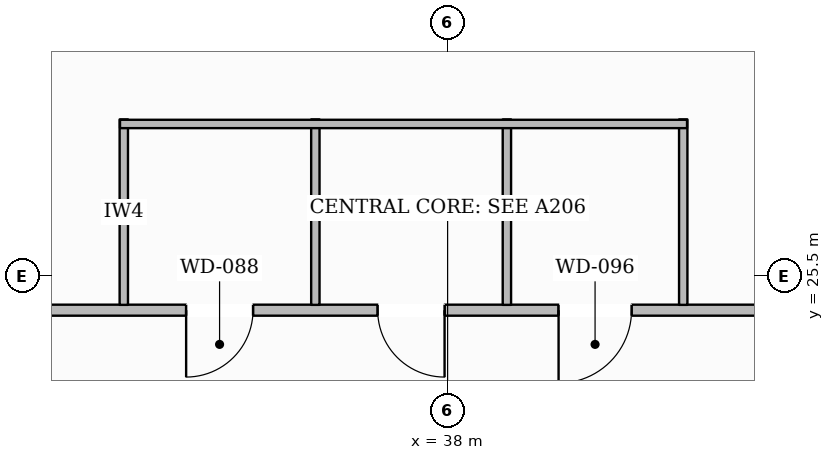
"""IFC4 building model, lengths in metres.
Left out: names, types, materials, properties, quantities, classifications, styles, units other than length and angle.
Written with IfcOpenShell. Run it as: python <this file> out.ifc"""

import sys

from ifc_helpers import new_model, si_unit, direction, frame, frame_2d, origin, place, context, subcontext, project, spatial, rectangle, extrude, element, fill, save


model = new_model("IFC4")
c1 = context("Model", 3, precision=1e-05, world=origin(), true_north=direction((0.0, 1.0)))
c2 = subcontext(c1, "Body", "Model", "MODEL_VIEW")
j1 = project(units=[si_unit("LENGTHUNIT", "METRE"), si_unit("PLANEANGLEUNIT", "RADIAN")], contexts=[c1])
p1 = place(None, origin())
s1 = spatial("IfcSite", under=j1, at=p1, CompositionType="ELEMENT")
p2 = place(p1, origin())
s2 = spatial("IfcBuilding", under=s1, at=p2, CompositionType="ELEMENT")
p3 = place(p2, frame((0.0, 0.0, 124.0)))
s3 = spatial("IfcBuildingStorey", under=s2, at=p3, CompositionType="ELEMENT", Elevation=124.0)
p4 = place(p3, frame((49.97, 25.05, 0.0), z_axis=(0.0, 0.0, 1.0), x_axis=(-1.0, 0.0, 0.0)))
e1 = element("IfcWall", 1, at=p4, inside=s3, PredefinedType="PARTITIONING", context=c2, shape_type="SweptSolid", body=[
    extrude(rectangle(XDim=23.94, YDim=0.145, at=frame_2d((11.97, 0.0))), origin(), (0.0, 0.0, 1.0), 3.6),
])
p5 = place(p4, frame((14.53, 0.0, 0.0)))
e2 = element("IfcOpeningElement", 2, at=p5, cuts=e1, PredefinedType="OPENING", context=c2, shape_type="SweptSolid", body=[
    extrude(rectangle(XDim=0.88, YDim=2.1, at=frame_2d((0.44, 1.05))), frame((0.0, 0.083, 0.0), z_axis=(0.0, -1.0, 0.0), x_axis=(1.0, 0.0, 0.0)), (0.0, 0.0, 1.0), 0.165),
])
p6 = place(p4, frame((12.01, 0.0, 0.0)))
e3 = element("IfcOpeningElement", 3, at=p6, cuts=e1, PredefinedType="OPENING", context=c2, shape_type="SweptSolid", body=[
    extrude(rectangle(XDim=0.88, YDim=2.1, at=frame_2d((0.44, 1.05))), frame((0.0, 0.083, 0.0), z_axis=(0.0, -1.0, 0.0), x_axis=(1.0, 0.0, 0.0)), (0.0, 0.0, 1.0), 0.165),
])
p7 = place(p4, frame((9.55, 0.0, 0.0)))
e4 = element("IfcOpeningElement", 4, at=p7, cuts=e1, PredefinedType="OPENING", context=c2, shape_type="SweptSolid", body=[
    extrude(rectangle(XDim=0.96, YDim=2.1, at=frame_2d((0.48, 1.05))), frame((0.0, 0.083, 0.0), z_axis=(0.0, -1.0, 0.0), x_axis=(1.0, 0.0, 0.0)), (0.0, 0.0, 1.0), 0.165),
])
p8 = place(p4, frame((3.826, 0.0, 0.0)))
e5 = element("IfcOpeningElement", 5, at=p8, cuts=e1, PredefinedType="OPENING", context=c2, shape_type="SweptSolid", body=[
    extrude(rectangle(XDim=1.4, YDim=2.2, at=frame_2d((0.7, 1.1))), frame((0.0, 0.083, 0.0), z_axis=(0.0, -1.0, 0.0), x_axis=(1.0, 0.0, 0.0)), (0.0, 0.0, 1.0), 0.165),
])
for number, where, z_axis, x_axis in (
    (6, (33.74, 25.12, 0.0), (0.0, 0.0, 1.0), (0.0, 1.0, 0.0)),
    (7, (36.26, 25.12, 0.0), (0.0, 0.0, 1.0), (0.0, 1.0, 0.0)),
    (8, (38.78, 25.12, 0.0), (0.0, 0.0, 1.0), (0.0, 1.0, 0.0)),
    (9, (41.1, 25.12, 0.0), (0.0, 0.0, 1.0), (0.0, 1.0, 0.0)),
):
    element("IfcWall", number, at=place(p3, frame(where, z_axis=z_axis, x_axis=x_axis)), inside=s3, PredefinedType="PLUMBINGWALL", context=c2, shape_type="SweptSolid", body=[
        extrude(rectangle(XDim=2.44, YDim=0.11, at=frame_2d((1.22, 0.0))), origin(), (0.0, 0.0, 1.0), 3.6),
    ])
p9 = place(p3, frame((33.69, 27.5, 0.0), z_axis=(0.0, 0.0, 1.0), x_axis=(1.0, 0.0, 0.0)))
e10 = element("IfcWall", 10, at=p9, inside=s3, PredefinedType="PLUMBINGWALL", context=c2, shape_type="SweptSolid", body=[
    extrude(rectangle(XDim=7.46, YDim=0.11, at=frame_2d((3.73, 0.0))), origin(), (0.0, 0.0, 1.0), 3.6),
])
p10 = place(p5, origin())
e11 = element("IfcDoor", 11, at=p10, inside=s3, OperationType="SINGLE_SWING_RIGHT", PredefinedType="DOOR", context=c2, shape_type="SweptSolid", body=[
    extrude(rectangle(XDim=0.88, YDim=2.1, at=frame_2d((0.44, 1.05))), frame((0.0, 0.025, 0.0), z_axis=(0.0, -1.0, 0.0), x_axis=(1.0, 0.0, 0.0)), (0.0, 0.0, 1.0), 0.05),
])
fill(e2, e11)
p11 = place(p6, origin())
e12 = element("IfcDoor", 12, at=p11, inside=s3, OperationType="SINGLE_SWING_LEFT", PredefinedType="DOOR", context=c2, shape_type="SweptSolid", body=[
    extrude(rectangle(XDim=0.88, YDim=2.1, at=frame_2d((0.44, 1.05))), frame((0.0, 0.025, 0.0), z_axis=(0.0, -1.0, 0.0), x_axis=(1.0, 0.0, 0.0)), (0.0, 0.0, 1.0), 0.05),
])
fill(e3, e12)
p12 = place(p7, origin())
e13 = element("IfcDoor", 13, at=p12, inside=s3, OperationType="SINGLE_SWING_RIGHT", PredefinedType="DOOR", context=c2, shape_type="SweptSolid", body=[
    extrude(rectangle(XDim=0.96, YDim=2.1, at=frame_2d((0.48, 1.05))), frame((0.0, 0.025, 0.0), z_axis=(0.0, -1.0, 0.0), x_axis=(1.0, 0.0, 0.0)), (0.0, 0.0, 1.0), 0.05),
])
fill(e4, e13)
save(model, sys.argv[1])
